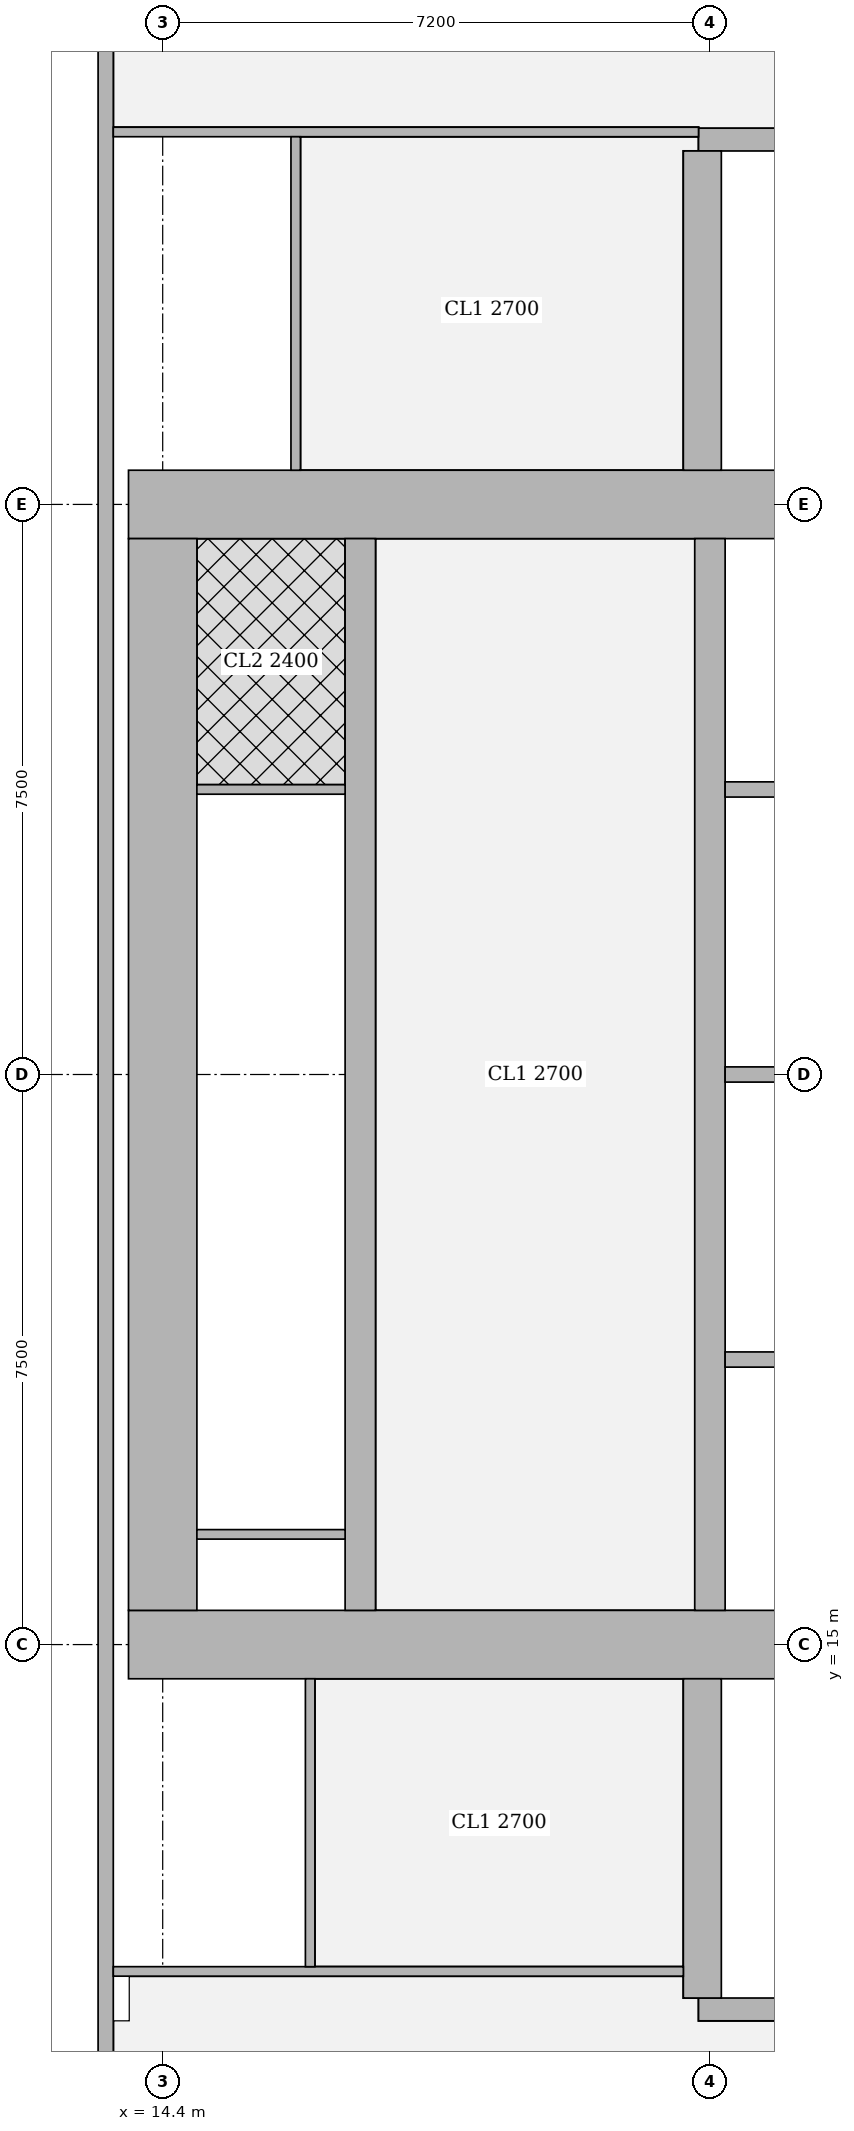
"""IFC4 building model, lengths in metres.
Left out: names, types, materials, properties, quantities, classifications, styles, units other than length and angle.
Written with IfcOpenShell. Run it as: python <this file> out.ifc"""

import sys

from ifc_helpers import new_model, si_unit, direction, frame, frame_2d, origin, place, context, subcontext, project, spatial, rectangle, extrude, element, fill, save


model = new_model("IFC4")
c1 = context("Model", 3, precision=1e-05, world=origin(), true_north=direction((0.0, 1.0)))
c2 = subcontext(c1, "Body", "Model", "MODEL_VIEW")
j1 = project(units=[si_unit("LENGTHUNIT", "METRE"), si_unit("PLANEANGLEUNIT", "RADIAN")], contexts=[c1])
p1 = place(None, origin())
s1 = spatial("IfcSite", under=j1, at=p1, CompositionType="ELEMENT")
p2 = place(p1, origin())
s2 = spatial("IfcBuilding", under=s1, at=p2, CompositionType="ELEMENT")
p3 = place(p2, frame((0.0, 0.0, 234.95)))
s3 = spatial("IfcBuildingStorey", under=s2, at=p3, CompositionType="ELEMENT", Elevation=234.95)
p4 = place(p3, frame((13.95, 15.0, 0.0), z_axis=(0.0, 0.0, 1.0), x_axis=(1.0, 0.0, 0.0)))
e1 = element("IfcWall", 1, at=p4, inside=s3, PredefinedType="SHEAR", context=c2, shape_type="SweptSolid", body=[
    extrude(rectangle(XDim=15.3, YDim=0.9, at=frame_2d((7.65, 0.0))), origin(), (0.0, 0.0, 1.0), 3.75),
])
p5 = place(p4, frame((4.45, 0.0, 0.0)))
e2 = element("IfcOpeningElement", 2, at=p5, cuts=e1, PredefinedType="OPENING", context=c2, shape_type="SweptSolid", body=[
    extrude(rectangle(XDim=1.8, YDim=2.1, at=frame_2d((0.9, 1.05))), frame((0.0, 0.46, 0.0), z_axis=(0.0, -1.0, 0.0), x_axis=(1.0, 0.0, 0.0)), (0.0, 0.0, 1.0), 0.92),
])
p6 = place(p4, frame((10.7, 0.0, 0.0)))
e3 = element("IfcOpeningElement", 3, at=p6, cuts=e1, PredefinedType="OPENING", context=c2, shape_type="SweptSolid", body=[
    extrude(rectangle(XDim=1.1, YDim=2.1, at=frame_2d((0.55, 1.05))), frame((0.0, 0.46, 0.0), z_axis=(0.0, -1.0, 0.0), x_axis=(1.0, 0.0, 0.0)), (0.0, 0.0, 1.0), 0.92),
])
p7 = place(p3, frame((13.95, 30.0, 0.0), z_axis=(0.0, 0.0, 1.0), x_axis=(1.0, 0.0, 0.0)))
e4 = element("IfcWall", 4, at=p7, inside=s3, PredefinedType="SHEAR", context=c2, shape_type="SweptSolid", body=[
    extrude(rectangle(XDim=15.3, YDim=0.9, at=frame_2d((7.65, 0.0))), origin(), (0.0, 0.0, 1.0), 3.75),
])
p8 = place(p7, frame((4.45, 0.0, 0.0)))
e5 = element("IfcOpeningElement", 5, at=p8, cuts=e4, PredefinedType="OPENING", context=c2, shape_type="SweptSolid", body=[
    extrude(rectangle(XDim=1.8, YDim=2.1, at=frame_2d((0.9, 1.05))), frame((0.0, 0.46, 0.0), z_axis=(0.0, -1.0, 0.0), x_axis=(1.0, 0.0, 0.0)), (0.0, 0.0, 1.0), 0.92),
])
p9 = place(p7, frame((10.7, 0.0, 0.0)))
e6 = element("IfcOpeningElement", 6, at=p9, cuts=e4, PredefinedType="OPENING", context=c2, shape_type="SweptSolid", body=[
    extrude(rectangle(XDim=1.1, YDim=2.1, at=frame_2d((0.55, 1.05))), frame((0.0, 0.46, 0.0), z_axis=(0.0, -1.0, 0.0), x_axis=(1.0, 0.0, 0.0)), (0.0, 0.0, 1.0), 0.92),
])
p10 = place(p3, frame((14.4, 15.45, 0.0), z_axis=(0.0, 0.0, 1.0), x_axis=(0.0, 1.0, 0.0)))
e7 = element("IfcWall", 7, at=p10, inside=s3, PredefinedType="SHEAR", context=c2, shape_type="SweptSolid", body=[
    extrude(rectangle(XDim=14.1, YDim=0.9, at=frame_2d((7.05, 0.0))), origin(), (0.0, 0.0, 1.0), 3.75),
])
p11 = place(p3, frame((17.0, 15.45, 0.0), z_axis=(0.0, 0.0, 1.0), x_axis=(0.0, 1.0, 0.0)))
e8 = element("IfcWall", 8, at=p11, inside=s3, PredefinedType="SHEAR", context=c2, shape_type="SweptSolid", body=[
    extrude(rectangle(XDim=14.1, YDim=0.4, at=frame_2d((7.05, 0.0))), origin(), (0.0, 0.0, 1.0), 3.75),
])
p12 = place(p11, frame((1.05, 0.0, 0.0)))
e9 = element("IfcOpeningElement", 9, at=p12, cuts=e8, PredefinedType="OPENING", context=c2, shape_type="SweptSolid", body=[
    extrude(rectangle(XDim=1.0, YDim=2.1, at=frame_2d((0.5, 1.05))), frame((0.0, 0.21, 0.0), z_axis=(0.0, -1.0, 0.0), x_axis=(1.0, 0.0, 0.0)), (0.0, 0.0, 1.0), 0.42),
])
p13 = place(p11, frame((4.675, 0.0, 0.0)))
e10 = element("IfcOpeningElement", 10, at=p13, cuts=e8, PredefinedType="OPENING", context=c2, shape_type="SweptSolid", body=[
    extrude(rectangle(XDim=1.0, YDim=2.1, at=frame_2d((0.5, 1.05))), frame((0.0, 0.21, 0.0), z_axis=(0.0, -1.0, 0.0), x_axis=(1.0, 0.0, 0.0)), (0.0, 0.0, 1.0), 0.42),
])
p14 = place(p11, frame((8.425, 0.0, 0.0)))
e11 = element("IfcOpeningElement", 11, at=p14, cuts=e8, PredefinedType="OPENING", context=c2, shape_type="SweptSolid", body=[
    extrude(rectangle(XDim=1.0, YDim=2.1, at=frame_2d((0.5, 1.05))), frame((0.0, 0.21, 0.0), z_axis=(0.0, -1.0, 0.0), x_axis=(1.0, 0.0, 0.0)), (0.0, 0.0, 1.0), 0.42),
])
p15 = place(p11, frame((12.175, 0.0, 0.0)))
e12 = element("IfcOpeningElement", 12, at=p15, cuts=e8, PredefinedType="OPENING", context=c2, shape_type="SweptSolid", body=[
    extrude(rectangle(XDim=1.0, YDim=2.1, at=frame_2d((0.5, 1.05))), frame((0.0, 0.21, 0.0), z_axis=(0.0, -1.0, 0.0), x_axis=(1.0, 0.0, 0.0)), (0.0, 0.0, 1.0), 0.42),
])
p16 = place(p3, frame((21.6, 15.45, 0.0), z_axis=(0.0, 0.0, 1.0), x_axis=(0.0, 1.0, 0.0)))
e13 = element("IfcWall", 13, at=p16, inside=s3, PredefinedType="SHEAR", context=c2, shape_type="SweptSolid", body=[
    extrude(rectangle(XDim=14.1, YDim=0.4, at=frame_2d((7.05, 0.0))), origin(), (0.0, 0.0, 1.0), 3.75),
])
p17 = place(p16, frame((0.875, 0.0, 0.0)))
e14 = element("IfcOpeningElement", 14, at=p17, cuts=e13, PredefinedType="OPENING", context=c2, shape_type="SweptSolid", body=[
    extrude(rectangle(XDim=1.1, YDim=2.1, at=frame_2d((0.55, 1.05))), frame((0.0, 0.21, 0.0), z_axis=(0.0, -1.0, 0.0), x_axis=(1.0, 0.0, 0.0)), (0.0, 0.0, 1.0), 0.42),
])
p18 = place(p16, frame((4.625, 0.0, 0.0)))
e15 = element("IfcOpeningElement", 15, at=p18, cuts=e13, PredefinedType="OPENING", context=c2, shape_type="SweptSolid", body=[
    extrude(rectangle(XDim=1.1, YDim=2.1, at=frame_2d((0.55, 1.05))), frame((0.0, 0.21, 0.0), z_axis=(0.0, -1.0, 0.0), x_axis=(1.0, 0.0, 0.0)), (0.0, 0.0, 1.0), 0.42),
])
p19 = place(p16, frame((8.375, 0.0, 0.0)))
e16 = element("IfcOpeningElement", 16, at=p19, cuts=e13, PredefinedType="OPENING", context=c2, shape_type="SweptSolid", body=[
    extrude(rectangle(XDim=1.1, YDim=2.1, at=frame_2d((0.55, 1.05))), frame((0.0, 0.21, 0.0), z_axis=(0.0, -1.0, 0.0), x_axis=(1.0, 0.0, 0.0)), (0.0, 0.0, 1.0), 0.42),
])
p20 = place(p16, frame((12.125, 0.0, 0.0)))
e17 = element("IfcOpeningElement", 17, at=p20, cuts=e13, PredefinedType="OPENING", context=c2, shape_type="SweptSolid", body=[
    extrude(rectangle(XDim=1.1, YDim=2.1, at=frame_2d((0.55, 1.05))), frame((0.0, 0.21, 0.0), z_axis=(0.0, -1.0, 0.0), x_axis=(1.0, 0.0, 0.0)), (0.0, 0.0, 1.0), 0.42),
])
p21 = place(p3, frame((21.45, 10.2, 0.0), z_axis=(0.0, 0.0, 1.0), x_axis=(1.0, 0.0, 0.0)))
e18 = element("IfcWall", 18, at=p21, inside=s3, PredefinedType="SHEAR", context=c2, shape_type="SweptSolid", body=[
    extrude(rectangle(XDim=7.5, YDim=0.3, at=frame_2d((3.75, 0.0))), origin(), (0.0, 0.0, 1.0), 3.75),
])
p22 = place(p21, frame((0.5, 0.0, 0.0)))
e19 = element("IfcOpeningElement", 19, at=p22, cuts=e18, PredefinedType="OPENING", context=c2, shape_type="SweptSolid", body=[
    extrude(rectangle(XDim=1.1, YDim=2.1, at=frame_2d((0.55, 1.05))), frame((0.0, 0.16, 0.0), z_axis=(0.0, -1.0, 0.0), x_axis=(1.0, 0.0, 0.0)), (0.0, 0.0, 1.0), 0.32),
])
p23 = place(p3, frame((21.5, 10.35, 0.0), z_axis=(0.0, 0.0, 1.0), x_axis=(0.0, 1.0, 0.0)))
e20 = element("IfcWall", 20, at=p23, inside=s3, PredefinedType="SHEAR", context=c2, shape_type="SweptSolid", body=[
    extrude(rectangle(XDim=4.2, YDim=0.5, at=frame_2d((2.1, 0.0))), origin(), (0.0, 0.0, 1.0), 3.75),
])
p24 = place(p3, frame((21.45, 34.8, 0.0), z_axis=(0.0, 0.0, 1.0), x_axis=(1.0, 0.0, 0.0)))
e21 = element("IfcWall", 21, at=p24, inside=s3, PredefinedType="SHEAR", context=c2, shape_type="SweptSolid", body=[
    extrude(rectangle(XDim=7.5, YDim=0.3, at=frame_2d((3.75, 0.0))), origin(), (0.0, 0.0, 1.0), 3.75),
])
p25 = place(p24, frame((0.5, 0.0, 0.0)))
e22 = element("IfcOpeningElement", 22, at=p25, cuts=e21, PredefinedType="OPENING", context=c2, shape_type="SweptSolid", body=[
    extrude(rectangle(XDim=1.1, YDim=2.1, at=frame_2d((0.55, 1.05))), frame((0.0, 0.16, 0.0), z_axis=(0.0, -1.0, 0.0), x_axis=(1.0, 0.0, 0.0)), (0.0, 0.0, 1.0), 0.32),
])
p26 = place(p3, frame((21.5, 30.45, 0.0), z_axis=(0.0, 0.0, 1.0), x_axis=(0.0, 1.0, 0.0)))
e23 = element("IfcWall", 23, at=p26, inside=s3, PredefinedType="SHEAR", context=c2, shape_type="SweptSolid", body=[
    extrude(rectangle(XDim=4.2, YDim=0.5, at=frame_2d((2.1, 0.0))), origin(), (0.0, 0.0, 1.0), 3.75),
])
p27 = place(p3, frame((13.65, 44.837, 0.0), z_axis=(0.0, 0.0, 1.0), x_axis=(0.0, -1.0, 0.0)))
e24 = element("IfcWall", 24, at=p27, inside=s3, PredefinedType="SOLIDWALL", context=c2, shape_type="SweptSolid", body=[
    extrude(rectangle(XDim=44.674, YDim=0.2, at=frame_2d((22.337, 0.0))), origin(), (0.0, 0.0, 1.0), 3.5),
])
p28 = place(p27, frame((1.889, 0.0, 0.9)))
e25 = element("IfcOpeningElement", 25, at=p28, cuts=e24, PredefinedType="OPENING", context=c2, shape_type="SweptSolid", body=[
    extrude(rectangle(XDim=2.4, YDim=1.5, at=frame_2d((1.2, 0.75))), frame((0.0, 0.11, 0.0), z_axis=(0.0, -1.0, 0.0), x_axis=(1.0, 0.0, 0.0)), (0.0, 0.0, 1.0), 0.22),
])
p29 = place(p27, frame((40.385, 0.0, 0.9)))
e26 = element("IfcOpeningElement", 26, at=p29, cuts=e24, PredefinedType="OPENING", context=c2, shape_type="SweptSolid", body=[
    extrude(rectangle(XDim=2.4, YDim=1.5, at=frame_2d((1.2, 0.75))), frame((0.0, 0.11, 0.0), z_axis=(0.0, -1.0, 0.0), x_axis=(1.0, 0.0, 0.0)), (0.0, 0.0, 1.0), 0.22),
])
p30 = place(p3, frame((13.75, 10.7, 0.0), z_axis=(0.0, 0.0, 1.0), x_axis=(1.0, 0.0, 0.0)))
e27 = element("IfcWall", 27, at=p30, inside=s3, PredefinedType="PARTITIONING", context=c2, shape_type="SweptSolid", body=[
    extrude(rectangle(XDim=7.5, YDim=0.125, at=frame_2d((3.75, 0.0))), origin(), (0.0, 0.0, 1.0), 3.5),
])
p31 = place(p30, frame((4.245, 0.0, 0.0)))
e28 = element("IfcOpeningElement", 28, at=p31, cuts=e27, PredefinedType="OPENING", context=c2, shape_type="SweptSolid", body=[
    extrude(rectangle(XDim=1.8, YDim=2.1, at=frame_2d((0.9, 1.05))), frame((0.0, 0.073, 0.0), z_axis=(0.0, -1.0, 0.0), x_axis=(1.0, 0.0, 0.0)), (0.0, 0.0, 1.0), 0.145),
])
p32 = place(p3, frame((13.75, 34.9, 0.0), z_axis=(0.0, 0.0, 1.0), x_axis=(1.0, 0.0, 0.0)))
e29 = element("IfcWall", 29, at=p32, inside=s3, PredefinedType="PARTITIONING", context=c2, shape_type="SweptSolid", body=[
    extrude(rectangle(XDim=7.7, YDim=0.125, at=frame_2d((3.85, 0.0))), origin(), (0.0, 0.0, 1.0), 3.5),
])
p33 = place(p32, frame((4.15, 0.0, 0.0)))
e30 = element("IfcOpeningElement", 30, at=p33, cuts=e29, PredefinedType="OPENING", context=c2, shape_type="SweptSolid", body=[
    extrude(rectangle(XDim=1.8, YDim=2.1, at=frame_2d((0.9, 1.05))), frame((0.0, 0.073, 0.0), z_axis=(0.0, -1.0, 0.0), x_axis=(1.0, 0.0, 0.0)), (0.0, 0.0, 1.0), 0.145),
])
p34 = place(p3, frame((16.34, 10.762, 0.0), z_axis=(0.0, 0.0, 1.0), x_axis=(0.0, 1.0, 0.0)))
e31 = element("IfcWall", 31, at=p34, inside=s3, PredefinedType="PARTITIONING", context=c2, shape_type="SweptSolid", body=[
    extrude(rectangle(XDim=3.788, YDim=0.125, at=frame_2d((1.894, 0.0))), origin(), (0.0, 0.0, 1.0), 3.5),
])
p35 = place(p34, frame((1.338, 0.0, 0.0)))
e32 = element("IfcOpeningElement", 32, at=p35, cuts=e31, PredefinedType="OPENING", context=c2, shape_type="SweptSolid", body=[
    extrude(rectangle(XDim=1.0, YDim=2.1, at=frame_2d((0.5, 1.05))), frame((0.0, 0.073, 0.0), z_axis=(0.0, -1.0, 0.0), x_axis=(1.0, 0.0, 0.0)), (0.0, 0.0, 1.0), 0.145),
])
p36 = place(p3, frame((16.15, 30.45, 0.0), z_axis=(0.0, 0.0, 1.0), x_axis=(0.0, 1.0, 0.0)))
e33 = element("IfcWall", 33, at=p36, inside=s3, PredefinedType="PARTITIONING", context=c2, shape_type="SweptSolid", body=[
    extrude(rectangle(XDim=4.387, YDim=0.125, at=frame_2d((2.193, 0.0))), origin(), (0.0, 0.0, 1.0), 3.5),
])
p37 = place(p36, frame((1.75, 0.0, 0.0)))
e34 = element("IfcOpeningElement", 34, at=p37, cuts=e33, PredefinedType="OPENING", context=c2, shape_type="SweptSolid", body=[
    extrude(rectangle(XDim=1.0, YDim=2.1, at=frame_2d((0.5, 1.05))), frame((0.0, 0.073, 0.0), z_axis=(0.0, -1.0, 0.0), x_axis=(1.0, 0.0, 0.0)), (0.0, 0.0, 1.0), 0.145),
])
p38 = place(p3, frame((14.85, 16.45, 0.0), z_axis=(0.0, 0.0, 1.0), x_axis=(1.0, 0.0, 0.0)))
e35 = element("IfcWall", 35, at=p38, inside=s3, PredefinedType="PARTITIONING", context=c2, shape_type="SweptSolid", body=[
    extrude(rectangle(XDim=1.95, YDim=0.125, at=frame_2d((0.975, 0.0))), origin(), (0.0, 0.0, 1.0), 3.5),
])
p39 = place(p38, frame((0.2, 0.0, 0.0)))
e36 = element("IfcOpeningElement", 36, at=p39, cuts=e35, PredefinedType="OPENING", context=c2, shape_type="SweptSolid", body=[
    extrude(rectangle(XDim=1.0, YDim=2.1, at=frame_2d((0.5, 1.05))), frame((0.0, 0.073, 0.0), z_axis=(0.0, -1.0, 0.0), x_axis=(1.0, 0.0, 0.0)), (0.0, 0.0, 1.0), 0.145),
])
p40 = place(p3, frame((14.85, 26.25, 0.0), z_axis=(0.0, 0.0, 1.0), x_axis=(1.0, 0.0, 0.0)))
e37 = element("IfcWall", 37, at=p40, inside=s3, PredefinedType="PARTITIONING", context=c2, shape_type="SweptSolid", body=[
    extrude(rectangle(XDim=1.95, YDim=0.125, at=frame_2d((0.975, 0.0))), origin(), (0.0, 0.0, 1.0), 3.5),
])
for number, where, z_axis, x_axis in (
    (38, (21.8, 18.75, 0.0), (0.0, 0.0, 1.0), (1.0, 0.0, 0.0)),
    (39, (21.8, 22.5, 0.0), (0.0, 0.0, 1.0), (1.0, 0.0, 0.0)),
    (40, (21.8, 26.25, 0.0), (0.0, 0.0, 1.0), (1.0, 0.0, 0.0)),
):
    element("IfcWall", number, at=place(p3, frame(where, z_axis=z_axis, x_axis=x_axis)), inside=s3, PredefinedType="SOLIDWALL", context=c2, shape_type="SweptSolid", body=[
        extrude(rectangle(XDim=2.2, YDim=0.2, at=frame_2d((1.1, 0.0))), origin(), (0.0, 0.0, 1.0), 3.5),
    ])
p41 = place(p35, origin())
e41 = element("IfcDoor", 41, at=p41, inside=s3, OperationType="SINGLE_SWING_LEFT", PredefinedType="DOOR", context=c2, shape_type="SweptSolid", body=[
    extrude(rectangle(XDim=1.0, YDim=2.1, at=frame_2d((0.5, 1.05))), frame((0.0, 0.025, 0.0), z_axis=(0.0, -1.0, 0.0), x_axis=(1.0, 0.0, 0.0)), (0.0, 0.0, 1.0), 0.05),
])
fill(e32, e41)
p42 = place(p31, origin())
e42 = element("IfcDoor", 42, at=p42, inside=s3, OperationType="DOUBLE_DOOR_SINGLE_SWING", PredefinedType="DOOR", context=c2, shape_type="SweptSolid", body=[
    extrude(rectangle(XDim=1.8, YDim=2.1, at=frame_2d((0.9, 1.05))), frame((0.0, 0.025, 0.0), z_axis=(0.0, -1.0, 0.0), x_axis=(1.0, 0.0, 0.0)), (0.0, 0.0, 1.0), 0.05),
])
fill(e28, e42)
p43 = place(p37, origin())
e43 = element("IfcDoor", 43, at=p43, inside=s3, OperationType="SINGLE_SWING_RIGHT", PredefinedType="DOOR", context=c2, shape_type="SweptSolid", body=[
    extrude(rectangle(XDim=1.0, YDim=2.1, at=frame_2d((0.5, 1.05))), frame((0.0, 0.025, 0.0), z_axis=(0.0, -1.0, 0.0), x_axis=(1.0, 0.0, 0.0)), (0.0, 0.0, 1.0), 0.05),
])
fill(e34, e43)
p44 = place(p33, origin())
e44 = element("IfcDoor", 44, at=p44, inside=s3, OperationType="DOUBLE_DOOR_SINGLE_SWING", PredefinedType="DOOR", context=c2, shape_type="SweptSolid", body=[
    extrude(rectangle(XDim=1.8, YDim=2.1, at=frame_2d((0.9, 1.05))), frame((0.0, 0.025, 0.0), z_axis=(0.0, -1.0, 0.0), x_axis=(1.0, 0.0, 0.0)), (0.0, 0.0, 1.0), 0.05),
])
fill(e30, e44)
p45 = place(p39, origin())
e45 = element("IfcDoor", 45, at=p45, inside=s3, OperationType="SINGLE_SWING_RIGHT", PredefinedType="DOOR", context=c2, shape_type="SweptSolid", body=[
    extrude(rectangle(XDim=1.0, YDim=2.1, at=frame_2d((0.5, 1.05))), frame((0.0, 0.025, 0.0), z_axis=(0.0, -1.0, 0.0), x_axis=(1.0, 0.0, 0.0)), (0.0, 0.0, 1.0), 0.05),
])
fill(e36, e45)
p46 = place(p12, origin())
e46 = element("IfcDoor", 46, at=p46, inside=s3, OperationType="SINGLE_SWING_LEFT", PredefinedType="DOOR", context=c2, shape_type="SweptSolid", body=[
    extrude(rectangle(XDim=1.0, YDim=2.1, at=frame_2d((0.5, 1.05))), frame((0.0, 0.025, 0.0), z_axis=(0.0, -1.0, 0.0), x_axis=(1.0, 0.0, 0.0)), (0.0, 0.0, 1.0), 0.05),
])
fill(e9, e46)
p47 = place(p13, origin())
e47 = element("IfcDoor", 47, at=p47, inside=s3, OperationType="SINGLE_SWING_LEFT", PredefinedType="DOOR", context=c2, shape_type="SweptSolid", body=[
    extrude(rectangle(XDim=1.0, YDim=2.1, at=frame_2d((0.5, 1.05))), frame((0.0, 0.025, 0.0), z_axis=(0.0, -1.0, 0.0), x_axis=(1.0, 0.0, 0.0)), (0.0, 0.0, 1.0), 0.05),
])
fill(e10, e47)
p48 = place(p14, origin())
e48 = element("IfcDoor", 48, at=p48, inside=s3, OperationType="SINGLE_SWING_RIGHT", PredefinedType="DOOR", context=c2, shape_type="SweptSolid", body=[
    extrude(rectangle(XDim=1.0, YDim=2.1, at=frame_2d((0.5, 1.05))), frame((0.0, 0.025, 0.0), z_axis=(0.0, -1.0, 0.0), x_axis=(1.0, 0.0, 0.0)), (0.0, 0.0, 1.0), 0.05),
])
fill(e11, e48)
p49 = place(p15, origin())
e49 = element("IfcDoor", 49, at=p49, inside=s3, OperationType="SINGLE_SWING_RIGHT", PredefinedType="DOOR", context=c2, shape_type="SweptSolid", body=[
    extrude(rectangle(XDim=1.0, YDim=2.1, at=frame_2d((0.5, 1.05))), frame((0.0, 0.025, 0.0), z_axis=(0.0, -1.0, 0.0), x_axis=(1.0, 0.0, 0.0)), (0.0, 0.0, 1.0), 0.05),
])
fill(e12, e49)
p50 = place(p5, origin())
e50 = element("IfcDoor", 50, at=p50, inside=s3, OperationType="DOUBLE_DOOR_SINGLE_SWING", PredefinedType="DOOR", context=c2, shape_type="SweptSolid", body=[
    extrude(rectangle(XDim=1.8, YDim=2.1, at=frame_2d((0.9, 1.05))), frame((0.0, 0.025, 0.0), z_axis=(0.0, -1.0, 0.0), x_axis=(1.0, 0.0, 0.0)), (0.0, 0.0, 1.0), 0.05),
])
fill(e2, e50)
p51 = place(p8, origin())
e51 = element("IfcDoor", 51, at=p51, inside=s3, OperationType="DOUBLE_DOOR_SINGLE_SWING", PredefinedType="DOOR", context=c2, shape_type="SweptSolid", body=[
    extrude(rectangle(XDim=1.8, YDim=2.1, at=frame_2d((0.9, 1.05))), frame((0.0, 0.025, 0.0), z_axis=(0.0, -1.0, 0.0), x_axis=(1.0, 0.0, 0.0)), (0.0, 0.0, 1.0), 0.05),
])
fill(e5, e51)
p52 = place(p17, origin())
e52 = element("IfcDoor", 52, at=p52, inside=s3, OperationType="DOUBLE_DOOR_SLIDING", PredefinedType="DOOR", context=c2, shape_type="SweptSolid", body=[
    extrude(rectangle(XDim=1.1, YDim=2.1, at=frame_2d((0.55, 1.05))), frame((0.0, 0.025, 0.0), z_axis=(0.0, -1.0, 0.0), x_axis=(1.0, 0.0, 0.0)), (0.0, 0.0, 1.0), 0.05),
])
fill(e14, e52)
p53 = place(p18, origin())
e53 = element("IfcDoor", 53, at=p53, inside=s3, OperationType="DOUBLE_DOOR_SLIDING", PredefinedType="DOOR", context=c2, shape_type="SweptSolid", body=[
    extrude(rectangle(XDim=1.1, YDim=2.1, at=frame_2d((0.55, 1.05))), frame((0.0, 0.025, 0.0), z_axis=(0.0, -1.0, 0.0), x_axis=(1.0, 0.0, 0.0)), (0.0, 0.0, 1.0), 0.05),
])
fill(e15, e53)
p54 = place(p19, origin())
e54 = element("IfcDoor", 54, at=p54, inside=s3, OperationType="DOUBLE_DOOR_SLIDING", PredefinedType="DOOR", context=c2, shape_type="SweptSolid", body=[
    extrude(rectangle(XDim=1.1, YDim=2.1, at=frame_2d((0.55, 1.05))), frame((0.0, 0.025, 0.0), z_axis=(0.0, -1.0, 0.0), x_axis=(1.0, 0.0, 0.0)), (0.0, 0.0, 1.0), 0.05),
])
fill(e16, e54)
p55 = place(p20, origin())
e55 = element("IfcDoor", 55, at=p55, inside=s3, OperationType="DOUBLE_DOOR_SLIDING", PredefinedType="DOOR", context=c2, shape_type="SweptSolid", body=[
    extrude(rectangle(XDim=1.1, YDim=2.1, at=frame_2d((0.55, 1.05))), frame((0.0, 0.025, 0.0), z_axis=(0.0, -1.0, 0.0), x_axis=(1.0, 0.0, 0.0)), (0.0, 0.0, 1.0), 0.05),
])
fill(e17, e55)
p56 = place(p22, origin())
e56 = element("IfcDoor", 56, at=p56, inside=s3, OperationType="SINGLE_SWING_LEFT", PredefinedType="DOOR", context=c2, shape_type="SweptSolid", body=[
    extrude(rectangle(XDim=1.1, YDim=2.1, at=frame_2d((0.55, 1.05))), frame((0.0, 0.025, 0.0), z_axis=(0.0, -1.0, 0.0), x_axis=(1.0, 0.0, 0.0)), (0.0, 0.0, 1.0), 0.05),
])
fill(e19, e56)
p57 = place(p25, origin())
e57 = element("IfcDoor", 57, at=p57, inside=s3, OperationType="SINGLE_SWING_RIGHT", PredefinedType="DOOR", context=c2, shape_type="SweptSolid", body=[
    extrude(rectangle(XDim=1.1, YDim=2.1, at=frame_2d((0.55, 1.05))), frame((0.0, 0.025, 0.0), z_axis=(0.0, -1.0, 0.0), x_axis=(1.0, 0.0, 0.0)), (0.0, 0.0, 1.0), 0.05),
])
fill(e22, e57)
save(model, sys.argv[1])
